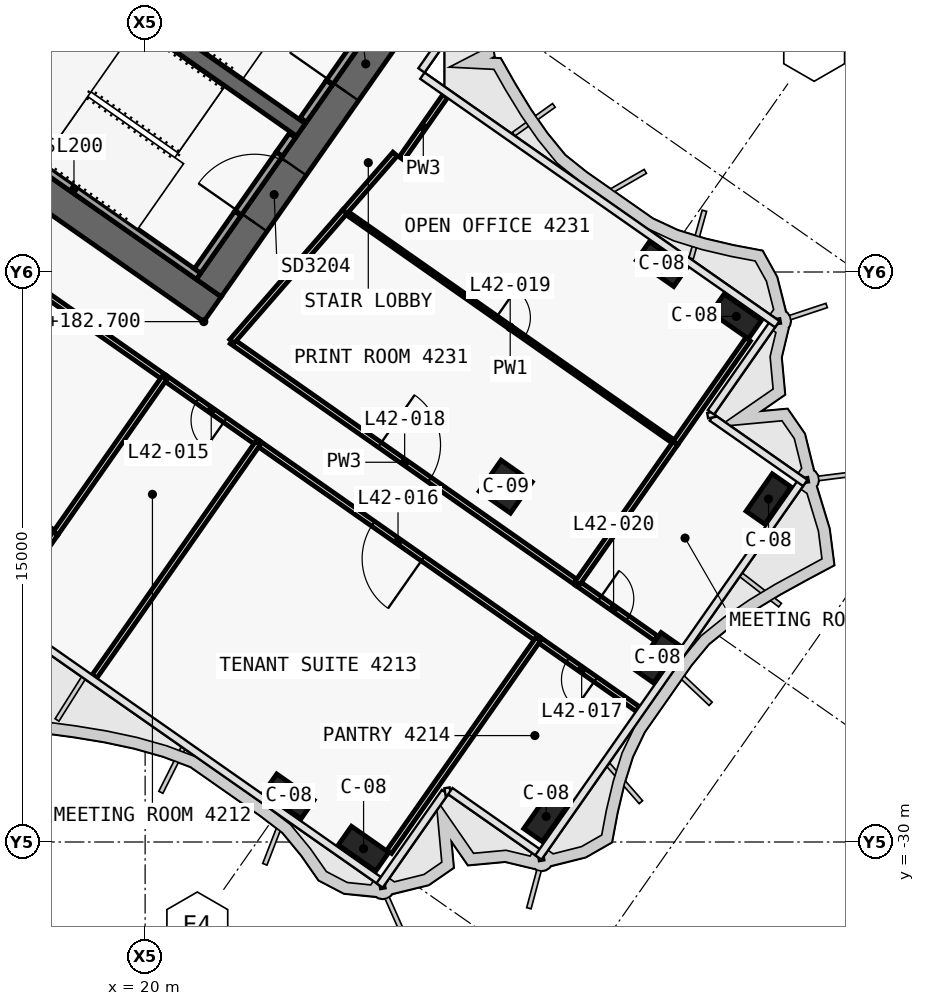
"""IFC4 building model, lengths in metres.
Left out: names, types, materials, properties, quantities, classifications, styles, units other than length and angle.
Written with IfcOpenShell. Run it as: python <this file> out.ifc"""

import sys

from ifc_helpers import new_model, si_unit, direction, frame, frame_2d, origin, origin_2d, place, context, subcontext, project, spatial, polyline, rectangle, outline, extrude, element, fill, save


model = new_model("IFC4")
c1 = context("Model", 3, precision=1e-05, world=origin(), true_north=direction((0.0, 1.0)))
c2 = subcontext(c1, "Body", "Model", "MODEL_VIEW")
j1 = project(units=[si_unit("LENGTHUNIT", "METRE"), si_unit("PLANEANGLEUNIT", "RADIAN")], contexts=[c1])
p1 = place(None, origin())
s1 = spatial("IfcSite", under=j1, at=p1, CompositionType="ELEMENT")
p2 = place(p1, origin())
s2 = spatial("IfcBuilding", under=s1, at=p2, CompositionType="ELEMENT")
p3 = place(p2, frame((0.0, 0.0, 182.7)))
s3 = spatial("IfcBuildingStorey", under=s2, at=p3, CompositionType="ELEMENT", Elevation=182.7)
p4 = place(p3, frame((-0.029, -0.712, 0.0), z_axis=(0.0, 0.0, 1.0), x_axis=(0.819151758019, -0.573576845187, 0.0)))
e1 = element("IfcWall", 1, at=p4, inside=s3, PredefinedType="SHEAR", context=c2, shape_type="SweptSolid", body=[
    extrude(outline(polyline([(26.616, 0.4), (-0.0, 0.4), (0.56, -0.4), (26.616, -0.4), (26.616, 0.4)])), origin(), (0.0, 0.0, 1.0), 3.9),
])
p5 = place(p4, frame((6.666, 0.0, 0.0)))
e2 = element("IfcOpeningElement", 2, at=p5, cuts=e1, PredefinedType="OPENING", context=c2, shape_type="SweptSolid", body=[
    extrude(rectangle(XDim=1.5, YDim=2.1, at=frame_2d((0.75, 1.05))), frame((0.0, 0.41, 0.0), z_axis=(0.0, -1.0, 0.0), x_axis=(1.0, 0.0, 0.0)), (0.0, 0.0, 1.0), 0.82),
])
p6 = place(p4, frame((12.366, 0.0, 0.0)))
e3 = element("IfcOpeningElement", 3, at=p6, cuts=e1, PredefinedType="OPENING", context=c2, shape_type="SweptSolid", body=[
    extrude(rectangle(XDim=1.5, YDim=2.1, at=frame_2d((0.75, 1.05))), frame((0.0, 0.41, 0.0), z_axis=(0.0, -1.0, 0.0), x_axis=(1.0, 0.0, 0.0)), (0.0, 0.0, 1.0), 0.82),
])
p7 = place(p3, frame((21.675, -15.421, 0.0), z_axis=(0.0, 0.0, 1.0), x_axis=(0.573581815061, 0.819148278049, 0.0)))
e4 = element("IfcWall", 4, at=p7, inside=s3, PredefinedType="SHEAR", context=c2, shape_type="SweptSolid", body=[
    extrude(outline(polyline([(9.6, 0.4), (0.0, 0.4), (0.0, -0.4), (9.6, -0.4), (9.6, 0.4)])), origin(), (0.0, 0.0, 1.0), 3.9),
])
p8 = place(p7, frame((6.3, 0.0, 0.0)))
e5 = element("IfcOpeningElement", 5, at=p8, cuts=e4, PredefinedType="OPENING", context=c2, shape_type="SweptSolid", body=[
    extrude(rectangle(XDim=1.8, YDim=2.1, at=frame_2d((0.9, 1.05))), frame((0.0, 0.41, 0.0), z_axis=(0.0, -1.0, 0.0), x_axis=(1.0, 0.0, 0.0)), (0.0, 0.0, 1.0), 0.82),
])
p9 = place(p7, frame((2.1, 0.0, 0.0)))
e6 = element("IfcOpeningElement", 6, at=p9, cuts=e4, PredefinedType="OPENING", context=c2, shape_type="SweptSolid", body=[
    extrude(rectangle(XDim=1.8, YDim=2.1, at=frame_2d((0.9, 1.05))), frame((0.0, 0.41, 0.0), z_axis=(0.0, -1.0, 0.0), x_axis=(1.0, 0.0, 0.0)), (0.0, 0.0, 1.0), 0.82),
])
p10 = place(p3, frame((2.638, 3.768, 0.0), z_axis=(0.0, 0.0, 1.0), x_axis=(0.81915267502, -0.573575535572, 0.0)))
e7 = element("IfcWall", 7, at=p10, inside=s3, PredefinedType="SHEAR", context=c2, shape_type="SweptSolid", body=[
    extrude(outline(polyline([(0.0, 0.2), (0.0, -0.2), (26.2, -0.2), (26.2, 0.2), (0.0, 0.2)])), origin(), (0.0, 0.0, 1.0), 3.9),
])
p11 = place(p10, frame((9.637, 0.0, 0.0)))
e8 = element("IfcOpeningElement", 8, at=p11, cuts=e7, PredefinedType="OPENING", context=c2, shape_type="SweptSolid", body=[
    extrude(rectangle(XDim=1.2, YDim=2.1, at=frame_2d((0.6, 1.05))), frame((0.0, 0.21, 0.0), z_axis=(0.0, -1.0, 0.0), x_axis=(1.0, 0.0, 0.0)), (0.0, 0.0, 1.0), 0.42),
])
p12 = place(p10, frame((11.812, 0.0, 0.0)))
e9 = element("IfcOpeningElement", 9, at=p12, cuts=e7, PredefinedType="OPENING", context=c2, shape_type="SweptSolid", body=[
    extrude(rectangle(XDim=1.2, YDim=2.1, at=frame_2d((0.6, 1.05))), frame((0.0, 0.21, 0.0), z_axis=(0.0, -1.0, 0.0), x_axis=(1.0, 0.0, 0.0)), (0.0, 0.0, 1.0), 0.42),
])
p13 = place(p10, frame((13.988, 0.0, 0.0)))
e10 = element("IfcOpeningElement", 10, at=p13, cuts=e7, PredefinedType="OPENING", context=c2, shape_type="SweptSolid", body=[
    extrude(rectangle(XDim=1.2, YDim=2.1, at=frame_2d((0.6, 1.05))), frame((0.0, 0.21, 0.0), z_axis=(0.0, -1.0, 0.0), x_axis=(1.0, 0.0, 0.0)), (0.0, 0.0, 1.0), 0.42),
])
p14 = place(p10, frame((16.262, 0.0, 0.0)))
e11 = element("IfcOpeningElement", 11, at=p14, cuts=e7, PredefinedType="OPENING", context=c2, shape_type="SweptSolid", body=[
    extrude(rectangle(XDim=1.0, YDim=2.1, at=frame_2d((0.5, 1.05))), frame((0.0, 0.21, 0.0), z_axis=(0.0, -1.0, 0.0), x_axis=(1.0, 0.0, 0.0)), (0.0, 0.0, 1.0), 0.42),
])
for number, where, z_axis, x_axis in (
    (12, (23.782, -28.799, 0.0), (0.0, 0.0, 1.0), (0.819, -0.574, 0.0)),
    (13, (25.748, -30.176, 0.0), (0.0, 0.0, 1.0), (0.819, -0.574, 0.0)),
    (14, (33.591, -14.792, 0.0), (0.0, 0.0, 1.0), (0.819, -0.574, 0.0)),
    (15, (35.556, -16.168, 0.0), (0.0, 0.0, 1.0), (0.819, -0.574, 0.0)),
    (16, (30.553, -29.329, 0.0), (0.0, 0.0, 1.0), (0.574, 0.819, 0.0)),
    (17, (33.479, -25.151, 0.0), (0.0, 0.0, 1.0), (0.574, 0.819, 0.0)),
    (18, (36.404, -20.973, 0.0), (0.0, 0.0, 1.0), (0.574, 0.819, 0.0)),
):
    element("IfcColumn", number, at=place(p3, frame(where, z_axis=z_axis, x_axis=x_axis)), inside=s3, PredefinedType="COLUMN", context=c2, shape_type="SweptSolid", body=[
        extrude(rectangle(XDim=1.2, YDim=0.6, at=origin_2d()), origin(), (0.0, 0.0, 1.0), 3.9),
    ])
p15 = place(p3, frame((29.49, -20.649, 0.0), z_axis=(0.0, 0.0, 1.0), x_axis=(0.819152044289, -0.573576436351, 0.0)))
e19 = element("IfcColumn", 19, at=p15, inside=s3, PredefinedType="COLUMN", context=c2, shape_type="SweptSolid", body=[
    extrude(rectangle(XDim=1.0, YDim=1.0, at=origin_2d()), origin(), (0.0, 0.0, 1.0), 3.9),
])
p16 = place(p3, frame((24.162, -10.998, 0.0), z_axis=(0.0, 0.0, 1.0), x_axis=(0.573612502218, 0.819126789514, 0.0)))
e20 = element("IfcWall", 20, at=p16, inside=s3, PredefinedType="SOLIDWALL", context=c2, shape_type="SweptSolid", body=[
    extrude(rectangle(XDim=1.2, YDim=0.2, at=frame_2d((0.6, 0.0))), origin(), (0.0, 0.0, 1.0), 3.62),
])
p17 = place(p3, frame((24.85, -10.014, 2.15), z_axis=(0.0, 0.0, 1.0), x_axis=(0.573505465124, 0.819201734296, 0.0)))
e21 = element("IfcWall", 21, at=p17, inside=s3, PredefinedType="SOLIDWALL", context=c2, shape_type="SweptSolid", body=[
    extrude(rectangle(XDim=1.9, YDim=0.2, at=frame_2d((0.95, 0.0))), origin(), (0.0, 0.0, 1.0), 1.47),
])
p18 = place(p3, frame((14.851, -10.521, 0.0), z_axis=(0.0, 0.0, 1.0), x_axis=(0.819141584393, -0.57359137434, 0.0)))
e22 = element("IfcWall", 22, at=p18, inside=s3, PredefinedType="SOLIDWALL", context=c2, shape_type="SweptSolid", body=[
    extrude(rectangle(XDim=8.0, YDim=0.2, at=frame_2d((4.0, 0.0))), origin(), (0.0, 0.0, 1.0), 3.62),
])
p19 = place(p3, frame((21.38, -14.97, 0.0), z_axis=(0.0, 0.0, 1.0), x_axis=(0.573559770908, 0.819163713305, 0.0)))
e23 = element("IfcWall", 23, at=p19, inside=s3, PredefinedType="SOLIDWALL", context=c2, shape_type="SweptSolid", body=[
    extrude(rectangle(XDim=1.85, YDim=0.2, at=frame_2d((0.925, 0.0))), origin(), (0.0, 0.0, 1.0), 3.62),
])
p20 = place(p3, frame((23.531, -11.898, 0.0), z_axis=(0.0, 0.0, 1.0), x_axis=(0.573708088123, 0.819059844958, 0.0)))
e24 = element("IfcWall", 24, at=p20, inside=s3, PredefinedType="SOLIDWALL", context=c2, shape_type="SweptSolid", body=[
    extrude(rectangle(XDim=0.6, YDim=0.2, at=frame_2d((0.3, 0.0))), origin(), (0.0, 0.0, 1.0), 3.62),
])
p21 = place(p3, frame((22.441, -13.455, 2.15), z_axis=(0.0, 0.0, 1.0), x_axis=(0.573591692345, 0.819141361715, 0.0)))
e25 = element("IfcWall", 25, at=p21, inside=s3, PredefinedType="SOLIDWALL", context=c2, shape_type="SweptSolid", body=[
    extrude(rectangle(XDim=1.9, YDim=0.2, at=frame_2d((0.95, 0.0))), origin(), (0.0, 0.0, 1.0), 1.47),
])
p22 = place(p3, frame((22.283, -16.824, 0.0), z_axis=(0.0, 0.0, 1.0), x_axis=(0.819159575642, -0.573565680313, 0.0)))
e26 = element("IfcWall", 26, at=p22, inside=s3, PredefinedType="PARTITIONING", context=c2, shape_type="SweptSolid", body=[
    extrude(rectangle(XDim=11.099, YDim=0.15, at=frame_2d((5.549, 0.0))), origin(), (0.0, 0.0, 1.0), 3.0),
])
p23 = place(p22, frame((4.75, 0.0, 0.0)))
e27 = element("IfcOpeningElement", 27, at=p23, cuts=e26, PredefinedType="OPENING", context=c2, shape_type="SweptSolid", body=[
    extrude(rectangle(XDim=1.6, YDim=2.1, at=frame_2d((0.8, 1.05))), frame((0.0, 0.085, 0.0), z_axis=(0.0, -1.0, 0.0), x_axis=(1.0, 0.0, 0.0)), (0.0, 0.0, 1.0), 0.17),
])
p24 = place(p3, frame((31.372, -23.188, 0.0), z_axis=(0.0, 0.0, 1.0), x_axis=(0.819150379241, -0.573578814278, 0.0)))
e28 = element("IfcWall", 28, at=p24, inside=s3, PredefinedType="PARTITIONING", context=c2, shape_type="SweptSolid", body=[
    extrude(rectangle(XDim=2.532, YDim=0.15, at=frame_2d((1.266, 0.0))), origin(), (0.0, 0.0, 1.0), 3.0),
])
p25 = place(p24, frame((0.716, 0.0, 0.0)))
e29 = element("IfcOpeningElement", 29, at=p25, cuts=e28, PredefinedType="OPENING", context=c2, shape_type="SweptSolid", body=[
    extrude(rectangle(XDim=0.9, YDim=2.1, at=frame_2d((0.45, 1.05))), frame((0.0, 0.085, 0.0), z_axis=(0.0, -1.0, 0.0), x_axis=(1.0, 0.0, 0.0)), (0.0, 0.0, 1.0), 0.17),
])
p26 = place(p3, frame((20.513, -17.781, 0.0), z_axis=(0.0, 0.0, 1.0), x_axis=(-0.819147172988, 0.573583393228, 0.0)))
e30 = element("IfcWall", 30, at=p26, inside=s3, PredefinedType="PARTITIONING", context=c2, shape_type="SweptSolid", body=[
    extrude(rectangle(XDim=18.002, YDim=0.15, at=frame_2d((9.001, 0.0))), origin(), (0.0, 0.0, 1.0), 3.0),
])
p27 = place(p26, frame((8.201, 0.0, 0.0)))
e31 = element("IfcOpeningElement", 31, at=p27, cuts=e30, PredefinedType="OPENING", context=c2, shape_type="SweptSolid", body=[
    extrude(rectangle(XDim=1.6, YDim=2.1, at=frame_2d((0.8, 1.05))), frame((0.0, 0.085, 0.0), z_axis=(0.0, -1.0, 0.0), x_axis=(1.0, 0.0, 0.0)), (0.0, 0.0, 1.0), 0.17),
])
p28 = place(p3, frame((22.97, -19.502, 0.0), z_axis=(0.0, 0.0, 1.0), x_axis=(-0.819128818764, 0.573609604409, 0.0)))
e32 = element("IfcWall", 32, at=p28, inside=s3, PredefinedType="PARTITIONING", context=c2, shape_type="SweptSolid", body=[
    extrude(rectangle(XDim=3.004, YDim=0.15, at=frame_2d((1.502, 0.0))), origin(), (0.0, 0.0, 1.0), 3.0),
])
p29 = place(p28, frame((1.052, 0.0, 0.0)))
e33 = element("IfcOpeningElement", 33, at=p29, cuts=e32, PredefinedType="OPENING", context=c2, shape_type="SweptSolid", body=[
    extrude(rectangle(XDim=0.9, YDim=2.1, at=frame_2d((0.45, 1.05))), frame((0.0, 0.085, 0.0), z_axis=(0.0, -1.0, 0.0), x_axis=(1.0, 0.0, 0.0)), (0.0, 0.0, 1.0), 0.17),
])
p30 = place(p3, frame((30.343, -24.664, 0.0), z_axis=(0.0, 0.0, 1.0), x_axis=(-0.819151661297, 0.57357698332, 0.0)))
e34 = element("IfcWall", 34, at=p30, inside=s3, PredefinedType="PARTITIONING", context=c2, shape_type="SweptSolid", body=[
    extrude(rectangle(XDim=9.004, YDim=0.15, at=frame_2d((4.502, 0.0))), origin(), (0.0, 0.0, 1.0), 3.0),
])
p31 = place(p30, frame((3.702, 0.0, 0.0)))
e35 = element("IfcOpeningElement", 35, at=p31, cuts=e34, PredefinedType="OPENING", context=c2, shape_type="SweptSolid", body=[
    extrude(rectangle(XDim=1.6, YDim=2.1, at=frame_2d((0.8, 1.05))), frame((0.0, 0.085, 0.0), z_axis=(0.0, -1.0, 0.0), x_axis=(1.0, 0.0, 0.0)), (0.0, 0.0, 1.0), 0.17),
])
p32 = place(p3, frame((32.962, -26.499, 0.0), z_axis=(0.0, 0.0, 1.0), x_axis=(-0.819163851829, 0.573559573067, 0.0)))
e36 = element("IfcWall", 36, at=p32, inside=s3, PredefinedType="PARTITIONING", context=c2, shape_type="SweptSolid", body=[
    extrude(rectangle(XDim=3.202, YDim=0.15, at=frame_2d((1.601, 0.0))), origin(), (0.0, 0.0, 1.0), 2.9),
])
p33 = place(p32, frame((1.351, 0.0, 0.0)))
e37 = element("IfcOpeningElement", 37, at=p33, cuts=e36, PredefinedType="OPENING", context=c2, shape_type="SweptSolid", body=[
    extrude(rectangle(XDim=0.9, YDim=2.1, at=frame_2d((0.45, 1.05))), frame((0.0, 0.085, 0.0), z_axis=(0.0, -1.0, 0.0), x_axis=(1.0, 0.0, 0.0)), (0.0, 0.0, 1.0), 0.17),
])
p34 = place(p3, frame((25.258, -13.412, 0.0), z_axis=(0.0, 0.0, 1.0), x_axis=(0.81915089424, -0.573578078788, 0.0)))
e38 = element("IfcWall", 38, at=p34, inside=s3, PredefinedType="PARTITIONING", context=c2, shape_type="SweptSolid", body=[
    extrude(rectangle(XDim=10.618, YDim=0.1, at=frame_2d((5.309, 0.0))), origin(), (0.0, 0.0, 1.0), 3.0),
])
p35 = place(p34, frame((4.859, 0.0, 0.0)))
e39 = element("IfcOpeningElement", 39, at=p35, cuts=e38, PredefinedType="OPENING", context=c2, shape_type="SweptSolid", body=[
    extrude(rectangle(XDim=0.9, YDim=2.1, at=frame_2d((0.45, 1.05))), frame((0.0, 0.06, 0.0), z_axis=(0.0, -1.0, 0.0), x_axis=(1.0, 0.0, 0.0)), (0.0, 0.0, 1.0), 0.12),
])
p36 = place(p3, frame((35.865, -16.775, 0.0), z_axis=(0.0, 0.0, 1.0), x_axis=(-0.573560777794, -0.819163008306, 0.0)))
e40 = element("IfcWall", 40, at=p36, inside=s3, PredefinedType="PARTITIONING", context=c2, shape_type="SweptSolid", body=[
    extrude(rectangle(XDim=3.329, YDim=0.15, at=frame_2d((1.665, 0.0))), origin(), (0.0, 0.0, 1.0), 2.9),
])
p37 = place(p3, frame((25.258, -13.412, 0.0), z_axis=(0.0, 0.0, 1.0), x_axis=(0.656791883473, 0.75407189432, 0.0)))
e41 = element("IfcWall", 41, at=p37, inside=s3, PredefinedType="PARTITIONING", context=c2, shape_type="SweptSolid", body=[
    extrude(rectangle(XDim=2.01, YDim=0.15, at=frame_2d((1.005, 0.0))), origin(), (0.0, 0.0, 1.0), 3.62),
])
p38 = place(p3, frame((26.746, -12.014, 0.0), z_axis=(0.0, 0.0, 1.0), x_axis=(0.573568836472, 0.819157365729, 0.0)))
e42 = element("IfcWall", 42, at=p38, inside=s3, PredefinedType="PARTITIONING", context=c2, shape_type="SweptSolid", body=[
    extrude(rectangle(XDim=2.0, YDim=0.15, at=frame_2d((1.0, 0.0))), origin(), (0.0, 0.0, 1.0), 3.0),
])
p39 = place(p3, frame((33.954, -19.502, 0.0), z_axis=(0.0, 0.0, 1.0), x_axis=(-0.573560650686, -0.819163097304, 0.0)))
e43 = element("IfcWall", 43, at=p39, inside=s3, PredefinedType="PARTITIONING", context=c2, shape_type="SweptSolid", body=[
    extrude(rectangle(XDim=4.5, YDim=0.15, at=frame_2d((2.25, 0.0))), origin(), (0.0, 0.0, 1.0), 3.0),
])
p40 = place(p3, frame((22.285, -16.825, 0.0), z_axis=(0.0, 0.0, 1.0), x_axis=(0.656764910052, 0.754095387152, 0.0)))
e44 = element("IfcWall", 44, at=p40, inside=s3, PredefinedType="PARTITIONING", context=c2, shape_type="SweptSolid", body=[
    extrude(rectangle(XDim=4.525, YDim=0.15, at=frame_2d((2.263, 0.0))), origin(), (0.0, 0.0, 1.0), 3.0),
])
p41 = place(p3, frame((17.643, -21.877, 0.0), z_axis=(0.0, 0.0, 1.0), x_axis=(-0.819154173185, 0.573573395961, 0.0)))
e45 = element("IfcWall", 45, at=p41, inside=s3, PredefinedType="PARTITIONING", context=c2, shape_type="SweptSolid", body=[
    extrude(rectangle(XDim=18.0, YDim=0.1, at=frame_2d((9.0, 0.0))), origin(), (0.0, 0.0, 1.0), 3.0),
])
p42 = place(p41, frame((8.55, 0.0, 0.0)))
e46 = element("IfcOpeningElement", 46, at=p42, cuts=e45, PredefinedType="OPENING", context=c2, shape_type="SweptSolid", body=[
    extrude(rectangle(XDim=0.9, YDim=2.1, at=frame_2d((0.45, 1.05))), frame((0.0, 0.06, 0.0), z_axis=(0.0, -1.0, 0.0), x_axis=(1.0, 0.0, 0.0)), (0.0, 0.0, 1.0), 0.12),
])
p43 = place(p3, frame((17.643, -21.877, 0.0), z_axis=(0.0, 0.0, 1.0), x_axis=(-0.573560882037, -0.819162935317, 0.0)))
e47 = element("IfcWall", 47, at=p43, inside=s3, PredefinedType="PARTITIONING", context=c2, shape_type="SweptSolid", body=[
    extrude(rectangle(XDim=1.829, YDim=0.15, at=frame_2d((0.915, 0.0))), origin(), (0.0, 0.0, 1.0), 3.0),
])
p44 = place(p3, frame((20.511, -17.78, 0.0), z_axis=(0.0, 0.0, 1.0), x_axis=(-0.573554101347, -0.819167682973, 0.0)))
e48 = element("IfcWall", 48, at=p44, inside=s3, PredefinedType="PARTITIONING", context=c2, shape_type="SweptSolid", body=[
    extrude(rectangle(XDim=5.0, YDim=0.15, at=frame_2d((2.5, 0.0))), origin(), (0.0, 0.0, 1.0), 3.0),
])
p45 = place(p3, frame((22.969, -19.501, 0.0), z_axis=(0.0, 0.0, 1.0), x_axis=(-0.573575945067, -0.81915238829, 0.0)))
e49 = element("IfcWall", 49, at=p45, inside=s3, PredefinedType="PARTITIONING", context=c2, shape_type="SweptSolid", body=[
    extrude(rectangle(XDim=7.5, YDim=0.15, at=frame_2d((3.75, 0.0))), origin(), (0.0, 0.0, 1.0), 2.9),
])
p46 = place(p3, frame((30.341, -24.663, 0.0), z_axis=(0.0, 0.0, 1.0), x_axis=(-0.573577493031, -0.819151304393, 0.0)))
e50 = element("IfcWall", 50, at=p46, inside=s3, PredefinedType="PARTITIONING", context=c2, shape_type="SweptSolid", body=[
    extrude(rectangle(XDim=6.83, YDim=0.15, at=frame_2d((3.415, 0.0))), origin(), (0.0, 0.0, 1.0), 2.9),
])
p47 = place(p8, origin())
e51 = element("IfcDoor", 51, at=p47, inside=s3, OperationType="DOUBLE_DOOR_SINGLE_SWING", PredefinedType="DOOR", context=c2, shape_type="SweptSolid", body=[
    extrude(rectangle(XDim=1.8, YDim=2.1, at=frame_2d((0.9, 1.05))), frame((0.0, 0.025, 0.0), z_axis=(0.0, -1.0, 0.0), x_axis=(1.0, 0.0, 0.0)), (0.0, 0.0, 1.0), 0.05),
])
fill(e5, e51)
p48 = place(p9, origin())
e52 = element("IfcDoor", 52, at=p48, inside=s3, OperationType="DOUBLE_DOOR_SINGLE_SWING", PredefinedType="DOOR", context=c2, shape_type="SweptSolid", body=[
    extrude(rectangle(XDim=1.8, YDim=2.1, at=frame_2d((0.9, 1.05))), frame((0.0, 0.025, 0.0), z_axis=(0.0, -1.0, 0.0), x_axis=(1.0, 0.0, 0.0)), (0.0, 0.0, 1.0), 0.05),
])
fill(e6, e52)
p49 = place(p29, origin())
e53 = element("IfcDoor", 53, at=p49, inside=s3, OperationType="SINGLE_SWING_RIGHT", PredefinedType="DOOR", context=c2, shape_type="SweptSolid", body=[
    extrude(rectangle(XDim=0.9, YDim=2.1, at=frame_2d((0.45, 1.05))), frame((0.0, 0.025, 0.0), z_axis=(0.0, -1.0, 0.0), x_axis=(1.0, 0.0, 0.0)), (0.0, 0.0, 1.0), 0.05),
])
fill(e33, e53)
p50 = place(p31, origin())
e54 = element("IfcDoor", 54, at=p50, inside=s3, OperationType="DOUBLE_DOOR_SINGLE_SWING", PredefinedType="DOOR", context=c2, shape_type="SweptSolid", body=[
    extrude(rectangle(XDim=1.6, YDim=2.1, at=frame_2d((0.8, 1.05))), frame((0.0, 0.025, 0.0), z_axis=(0.0, -1.0, 0.0), x_axis=(1.0, 0.0, 0.0)), (0.0, 0.0, 1.0), 0.05),
])
fill(e35, e54)
p51 = place(p33, origin())
e55 = element("IfcDoor", 55, at=p51, inside=s3, OperationType="SINGLE_SWING_LEFT", PredefinedType="DOOR", context=c2, shape_type="SweptSolid", body=[
    extrude(rectangle(XDim=0.9, YDim=2.1, at=frame_2d((0.45, 1.05))), frame((0.0, 0.025, 0.0), z_axis=(0.0, -1.0, 0.0), x_axis=(1.0, 0.0, 0.0)), (0.0, 0.0, 1.0), 0.05),
])
fill(e37, e55)
p52 = place(p23, origin())
e56 = element("IfcDoor", 56, at=p52, inside=s3, OperationType="DOUBLE_DOOR_SINGLE_SWING", PredefinedType="DOOR", context=c2, shape_type="SweptSolid", body=[
    extrude(rectangle(XDim=1.6, YDim=2.1, at=frame_2d((0.8, 1.05))), frame((0.0, 0.025, 0.0), z_axis=(0.0, -1.0, 0.0), x_axis=(1.0, 0.0, 0.0)), (0.0, 0.0, 1.0), 0.05),
])
fill(e27, e56)
p53 = place(p35, origin())
e57 = element("IfcDoor", 57, at=p53, inside=s3, OperationType="SINGLE_SWING_RIGHT", PredefinedType="DOOR", context=c2, shape_type="SweptSolid", body=[
    extrude(rectangle(XDim=0.9, YDim=2.1, at=frame_2d((0.45, 1.05))), frame((0.0, 0.025, 0.0), z_axis=(0.0, -1.0, 0.0), x_axis=(1.0, 0.0, 0.0)), (0.0, 0.0, 1.0), 0.05),
])
fill(e39, e57)
p54 = place(p25, origin())
e58 = element("IfcDoor", 58, at=p54, inside=s3, OperationType="SINGLE_SWING_RIGHT", PredefinedType="DOOR", context=c2, shape_type="SweptSolid", body=[
    extrude(rectangle(XDim=0.9, YDim=2.1, at=frame_2d((0.45, 1.05))), frame((0.0, 0.025, 0.0), z_axis=(0.0, -1.0, 0.0), x_axis=(1.0, 0.0, 0.0)), (0.0, 0.0, 1.0), 0.05),
])
fill(e29, e58)
save(model, sys.argv[1])
